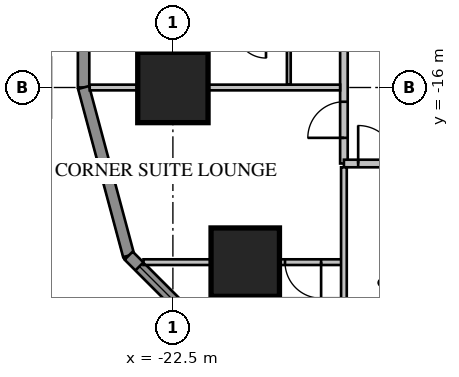
"""IFC4 building model, lengths in metres.
Left out: names, types, materials, properties, quantities, classifications, styles, units other than length and angle.
Written with IfcOpenShell. Run it as: python <this file> out.ifc"""

import sys

from ifc_helpers import new_model, si_unit, direction, frame, frame_2d, origin, origin_2d, place, context, subcontext, project, spatial, rectangle, extrude, element, fill, save


model = new_model("IFC4")
c1 = context("Model", 3, precision=1e-05, world=origin(), true_north=direction((0.0, 1.0)))
c2 = subcontext(c1, "Body", "Model", "MODEL_VIEW")
j1 = project(units=[si_unit("LENGTHUNIT", "METRE"), si_unit("PLANEANGLEUNIT", "RADIAN")], contexts=[c1])
p1 = place(None, origin())
s1 = spatial("IfcSite", under=j1, at=p1, CompositionType="ELEMENT")
p2 = place(p1, origin())
s2 = spatial("IfcBuilding", under=s1, at=p2, CompositionType="ELEMENT")
p3 = place(p2, frame((0.0, 0.0, 19.85)))
s3 = spatial("IfcBuildingStorey", under=s2, at=p3, CompositionType="ELEMENT", Elevation=19.85)
p4 = place(p3, frame((-22.5, -16.0, 0.0), z_axis=(0.0, 0.0, 1.0), x_axis=(1.0, 0.0, 0.0)))
e1 = element("IfcColumn", 1, at=p4, inside=s3, PredefinedType="COLUMN", context=c2, shape_type="SweptSolid", body=[
    extrude(rectangle(XDim=1.85, YDim=1.85, at=origin_2d()), origin(), (0.0, 0.0, 1.0), 3.85),
])
p5 = place(p3, frame((-20.596, -20.596, 0.0), z_axis=(0.0, 0.0, 1.0), x_axis=(1.0, 0.0, 0.0)))
e2 = element("IfcColumn", 2, at=p5, inside=s3, PredefinedType="COLUMN", context=c2, shape_type="SweptSolid", body=[
    extrude(rectangle(XDim=1.8, YDim=1.8, at=origin_2d()), origin(), (0.0, 0.0, 1.0), 3.85),
])
p6 = place(p3, frame((-24.85, 16.0, 0.0), z_axis=(0.0, 0.0, 1.0), x_axis=(0.0, -1.0, 0.0)))
e3 = element("IfcWall", 3, at=p6, inside=s3, PredefinedType="SOLIDWALL", context=c2, shape_type="SweptSolid", body=[
    extrude(rectangle(XDim=32.0, YDim=0.3, at=frame_2d((16.0, 0.0))), origin(), (0.0, 0.0, 1.0), 3.65),
])
p7 = place(p6, frame((1.2, 0.0, 0.75)))
e4 = element("IfcOpeningElement", 4, at=p7, cuts=e3, PredefinedType="OPENING", context=c2, shape_type="SweptSolid", body=[
    extrude(rectangle(XDim=1.6, YDim=1.8, at=frame_2d((0.8, 0.9))), frame((0.0, 0.17, 0.0), z_axis=(0.0, -1.0, 0.0), x_axis=(1.0, 0.0, 0.0)), (0.0, 0.0, 1.0), 0.34),
])
p8 = place(p6, frame((5.2, 0.0, 0.75)))
e5 = element("IfcOpeningElement", 5, at=p8, cuts=e3, PredefinedType="OPENING", context=c2, shape_type="SweptSolid", body=[
    extrude(rectangle(XDim=1.6, YDim=1.8, at=frame_2d((0.8, 0.9))), frame((0.0, 0.17, 0.0), z_axis=(0.0, -1.0, 0.0), x_axis=(1.0, 0.0, 0.0)), (0.0, 0.0, 1.0), 0.34),
])
p9 = place(p6, frame((17.2, 0.0, 0.75)))
e6 = element("IfcOpeningElement", 6, at=p9, cuts=e3, PredefinedType="OPENING", context=c2, shape_type="SweptSolid", body=[
    extrude(rectangle(XDim=1.6, YDim=1.8, at=frame_2d((0.8, 0.9))), frame((0.0, 0.17, 0.0), z_axis=(0.0, -1.0, 0.0), x_axis=(1.0, 0.0, 0.0)), (0.0, 0.0, 1.0), 0.34),
])
p10 = place(p6, frame((21.2, 0.0, 0.75)))
e7 = element("IfcOpeningElement", 7, at=p10, cuts=e3, PredefinedType="OPENING", context=c2, shape_type="SweptSolid", body=[
    extrude(rectangle(XDim=1.6, YDim=1.8, at=frame_2d((0.8, 0.9))), frame((0.0, 0.17, 0.0), z_axis=(0.0, -1.0, 0.0), x_axis=(1.0, 0.0, 0.0)), (0.0, 0.0, 1.0), 0.34),
])
p11 = place(p6, frame((25.2, 0.0, 0.75)))
e8 = element("IfcOpeningElement", 8, at=p11, cuts=e3, PredefinedType="OPENING", context=c2, shape_type="SweptSolid", body=[
    extrude(rectangle(XDim=1.6, YDim=1.8, at=frame_2d((0.8, 0.9))), frame((0.0, 0.17, 0.0), z_axis=(0.0, -1.0, 0.0), x_axis=(1.0, 0.0, 0.0)), (0.0, 0.0, 1.0), 0.34),
])
p12 = place(p6, frame((29.2, 0.0, 0.75)))
e9 = element("IfcOpeningElement", 9, at=p12, cuts=e3, PredefinedType="OPENING", context=c2, shape_type="SweptSolid", body=[
    extrude(rectangle(XDim=1.6, YDim=1.8, at=frame_2d((0.8, 0.9))), frame((0.0, 0.17, 0.0), z_axis=(0.0, -1.0, 0.0), x_axis=(1.0, 0.0, 0.0)), (0.0, 0.0, 1.0), 0.34),
])
p13 = place(p6, frame((8.8, 0.0, 0.75)))
e10 = element("IfcOpeningElement", 10, at=p13, cuts=e3, PredefinedType="OPENING", context=c2, shape_type="SweptSolid", body=[
    extrude(rectangle(XDim=2.4, YDim=1.8, at=frame_2d((1.2, 0.9))), frame((0.0, 0.17, 0.0), z_axis=(0.0, -1.0, 0.0), x_axis=(1.0, 0.0, 0.0)), (0.0, 0.0, 1.0), 0.34),
])
p14 = place(p6, frame((13.812, 0.0, 0.0)))
e11 = element("IfcOpeningElement", 11, at=p14, cuts=e3, PredefinedType="OPENING", context=c2, shape_type="SweptSolid", body=[
    extrude(rectangle(XDim=1.0, YDim=2.4, at=frame_2d((0.5, 1.2))), frame((0.0, 0.17, 0.0), z_axis=(0.0, -1.0, 0.0), x_axis=(1.0, 0.0, 0.0)), (0.0, 0.0, 1.0), 0.34),
])
p15 = place(p3, frame((-24.85, -16.0, 0.0), z_axis=(0.0, 0.0, 1.0), x_axis=(0.258839972501, -0.965920218567, 0.0)))
e12 = element("IfcWall", 12, at=p15, inside=s3, PredefinedType="SOLIDWALL", context=c2, shape_type="SweptSolid", body=[
    extrude(rectangle(XDim=4.581, YDim=0.3, at=frame_2d((2.291, 0.0))), origin(), (0.0, 0.0, 1.0), 3.65),
])
p16 = place(p3, frame((-23.664, -20.425, 0.0), z_axis=(0.0, 0.0, 1.0), x_axis=(0.707106781187, -0.707106781187, 0.0)))
e13 = element("IfcWall", 13, at=p16, inside=s3, PredefinedType="SOLIDWALL", context=c2, shape_type="SweptSolid", body=[
    extrude(rectangle(XDim=4.581, YDim=0.3, at=frame_2d((2.291, 0.0))), origin(), (0.0, 0.0, 1.0), 3.65),
])
p17 = place(p16, frame((0.4, 0.0, 0.75)))
e14 = element("IfcOpeningElement", 14, at=p17, cuts=e13, PredefinedType="OPENING", context=c2, shape_type="SweptSolid", body=[
    extrude(rectangle(XDim=3.781, YDim=1.8, at=frame_2d((1.891, 0.9))), frame((0.0, 0.17, 0.0), z_axis=(0.0, -1.0, 0.0), x_axis=(1.0, 0.0, 0.0)), (0.0, 0.0, 1.0), 0.34),
])
p18 = place(p3, frame((-18.0, 18.0, 0.0), z_axis=(0.0, 0.0, 1.0), x_axis=(0.0, -1.0, 0.0)))
e15 = element("IfcWall", 15, at=p18, inside=s3, PredefinedType="PARTITIONING", context=c2, shape_type="SweptSolid", body=[
    extrude(rectangle(XDim=36.0, YDim=0.2, at=frame_2d((18.0, 0.0))), origin(), (0.0, 0.0, 1.0), 3.65),
])
p19 = place(p18, frame((10.4, 0.0, 0.0)))
e16 = element("IfcOpeningElement", 16, at=p19, cuts=e15, PredefinedType="OPENING", context=c2, shape_type="SweptSolid", body=[
    extrude(rectangle(XDim=1.0, YDim=2.1, at=frame_2d((0.5, 1.05))), frame((0.0, 0.12, 0.0), z_axis=(0.0, -1.0, 0.0), x_axis=(1.0, 0.0, 0.0)), (0.0, 0.0, 1.0), 0.24),
])
p20 = place(p18, frame((14.4, 0.0, 0.0)))
e17 = element("IfcOpeningElement", 17, at=p20, cuts=e15, PredefinedType="OPENING", context=c2, shape_type="SweptSolid", body=[
    extrude(rectangle(XDim=1.0, YDim=2.1, at=frame_2d((0.5, 1.05))), frame((0.0, 0.12, 0.0), z_axis=(0.0, -1.0, 0.0), x_axis=(1.0, 0.0, 0.0)), (0.0, 0.0, 1.0), 0.24),
])
p21 = place(p18, frame((0.375, 0.0, 0.0)))
e18 = element("IfcOpeningElement", 18, at=p21, cuts=e15, PredefinedType="OPENING", context=c2, shape_type="SweptSolid", body=[
    extrude(rectangle(XDim=1.0, YDim=2.1, at=frame_2d((0.5, 1.05))), frame((0.0, 0.12, 0.0), z_axis=(0.0, -1.0, 0.0), x_axis=(1.0, 0.0, 0.0)), (0.0, 0.0, 1.0), 0.24),
])
p22 = place(p18, frame((34.375, 0.0, 0.0)))
e19 = element("IfcOpeningElement", 19, at=p22, cuts=e15, PredefinedType="OPENING", context=c2, shape_type="SweptSolid", body=[
    extrude(rectangle(XDim=0.95, YDim=2.1, at=frame_2d((0.475, 1.05))), frame((0.0, 0.12, 0.0), z_axis=(0.0, -1.0, 0.0), x_axis=(1.0, 0.0, 0.0)), (0.0, 0.0, 1.0), 0.24),
])
p23 = place(p3, frame((-19.45, 3.925, 0.0), z_axis=(0.0, 0.0, 1.0), x_axis=(0.0, -1.0, 0.0)))
e20 = element("IfcWall", 20, at=p23, inside=s3, PredefinedType="PARTITIONING", context=c2, shape_type="SweptSolid", body=[
    extrude(rectangle(XDim=19.85, YDim=0.1, at=frame_2d((9.925, 0.0))), origin(), (0.0, 0.0, 1.0), 3.65),
])
p24 = place(p23, frame((2.125, 0.0, 0.0)))
e21 = element("IfcOpeningElement", 21, at=p24, cuts=e20, PredefinedType="OPENING", context=c2, shape_type="SweptSolid", body=[
    extrude(rectangle(XDim=1.0, YDim=2.1, at=frame_2d((0.5, 1.05))), frame((0.0, 0.07, 0.0), z_axis=(0.0, -1.0, 0.0), x_axis=(1.0, 0.0, 0.0)), (0.0, 0.0, 1.0), 0.14),
])
p25 = place(p23, frame((0.3, 0.0, 0.0)))
e22 = element("IfcOpeningElement", 22, at=p25, cuts=e20, PredefinedType="OPENING", context=c2, shape_type="SweptSolid", body=[
    extrude(rectangle(XDim=0.8, YDim=2.1, at=frame_2d((0.4, 1.05))), frame((0.0, 0.07, 0.0), z_axis=(0.0, -1.0, 0.0), x_axis=(1.0, 0.0, 0.0)), (0.0, 0.0, 1.0), 0.14),
])
p26 = place(p23, frame((4.3, 0.0, 0.0)))
e23 = element("IfcOpeningElement", 23, at=p26, cuts=e20, PredefinedType="OPENING", context=c2, shape_type="SweptSolid", body=[
    extrude(rectangle(XDim=0.95, YDim=2.1, at=frame_2d((0.475, 1.05))), frame((0.0, 0.07, 0.0), z_axis=(0.0, -1.0, 0.0), x_axis=(1.0, 0.0, 0.0)), (0.0, 0.0, 1.0), 0.14),
])
p27 = place(p23, frame((8.3, 0.0, 0.0)))
e24 = element("IfcOpeningElement", 24, at=p27, cuts=e20, PredefinedType="OPENING", context=c2, shape_type="SweptSolid", body=[
    extrude(rectangle(XDim=0.95, YDim=2.1, at=frame_2d((0.475, 1.05))), frame((0.0, 0.07, 0.0), z_axis=(0.0, -1.0, 0.0), x_axis=(1.0, 0.0, 0.0)), (0.0, 0.0, 1.0), 0.14),
])
p28 = place(p23, frame((12.3, 0.0, 0.0)))
e25 = element("IfcOpeningElement", 25, at=p28, cuts=e20, PredefinedType="OPENING", context=c2, shape_type="SweptSolid", body=[
    extrude(rectangle(XDim=0.95, YDim=2.1, at=frame_2d((0.475, 1.05))), frame((0.0, 0.07, 0.0), z_axis=(0.0, -1.0, 0.0), x_axis=(1.0, 0.0, 0.0)), (0.0, 0.0, 1.0), 0.14),
])
p29 = place(p23, frame((16.3, 0.0, 0.0)))
e26 = element("IfcOpeningElement", 26, at=p29, cuts=e20, PredefinedType="OPENING", context=c2, shape_type="SweptSolid", body=[
    extrude(rectangle(XDim=0.95, YDim=2.1, at=frame_2d((0.475, 1.05))), frame((0.0, 0.07, 0.0), z_axis=(0.0, -1.0, 0.0), x_axis=(1.0, 0.0, 0.0)), (0.0, 0.0, 1.0), 0.14),
])
p30 = place(p3, frame((-18.1, -16.0, 0.0), z_axis=(0.0, 0.0, 1.0), x_axis=(-1.0, 0.0, 0.0)))
e27 = element("IfcWall", 27, at=p30, inside=s3, PredefinedType="PARTITIONING", context=c2, shape_type="SweptSolid", body=[
    extrude(rectangle(XDim=6.589, YDim=0.15, at=frame_2d((3.295, 0.0))), origin(), (0.0, 0.0, 1.0), 3.65),
])
p31 = place(p3, frame((-22.15, -14.475, 0.0), z_axis=(0.0, 0.0, 1.0), x_axis=(0.0, -1.0, 0.0)))
e28 = element("IfcWall", 28, at=p31, inside=s3, PredefinedType="PARTITIONING", context=c2, shape_type="SweptSolid", body=[
    extrude(rectangle(XDim=1.45, YDim=0.1, at=frame_2d((0.725, 0.0))), origin(), (0.0, 0.0, 1.0), 3.65),
])
p32 = place(p3, frame((-18.065, -20.596, 0.0), z_axis=(0.0, 0.0, 1.0), x_axis=(-1.0, 0.0, 0.0)))
e29 = element("IfcWall", 29, at=p32, inside=s3, PredefinedType="PARTITIONING", context=c2, shape_type="SweptSolid", body=[
    extrude(rectangle(XDim=5.209, YDim=0.15, at=frame_2d((2.604, 0.0))), origin(), (0.0, 0.0, 1.0), 3.65),
])
p33 = place(p32, frame((0.535, 0.0, 0.0)))
e30 = element("IfcOpeningElement", 30, at=p33, cuts=e29, PredefinedType="OPENING", context=c2, shape_type="SweptSolid", body=[
    extrude(rectangle(XDim=0.95, YDim=2.1, at=frame_2d((0.475, 1.05))), frame((0.0, 0.095, 0.0), z_axis=(0.0, -1.0, 0.0), x_axis=(1.0, 0.0, 0.0)), (0.0, 0.0, 1.0), 0.19),
])
p34 = place(p3, frame((-18.0, -18.0, 0.0), z_axis=(0.0, 0.0, 1.0), x_axis=(1.0, 0.0, 0.0)))
e31 = element("IfcWall", 31, at=p34, inside=s3, PredefinedType="PARTITIONING", context=c2, shape_type="SweptSolid", body=[
    extrude(rectangle(XDim=36.0, YDim=0.2, at=frame_2d((18.0, 0.0))), origin(), (0.0, 0.0, 1.0), 3.65),
])
p35 = place(p34, frame((0.375, 0.0, 0.0)))
e32 = element("IfcOpeningElement", 32, at=p35, cuts=e31, PredefinedType="OPENING", context=c2, shape_type="SweptSolid", body=[
    extrude(rectangle(XDim=1.0, YDim=2.1, at=frame_2d((0.5, 1.05))), frame((0.0, 0.12, 0.0), z_axis=(0.0, -1.0, 0.0), x_axis=(1.0, 0.0, 0.0)), (0.0, 0.0, 1.0), 0.24),
])
p36 = place(p34, frame((2.45, 0.0, 0.0)))
e33 = element("IfcOpeningElement", 33, at=p36, cuts=e31, PredefinedType="OPENING", context=c2, shape_type="SweptSolid", body=[
    extrude(rectangle(XDim=0.8, YDim=2.1, at=frame_2d((0.4, 1.05))), frame((0.0, 0.12, 0.0), z_axis=(0.0, -1.0, 0.0), x_axis=(1.0, 0.0, 0.0)), (0.0, 0.0, 1.0), 0.24),
])
p37 = place(p34, frame((4.05, 0.0, 0.0)))
e34 = element("IfcOpeningElement", 34, at=p37, cuts=e31, PredefinedType="OPENING", context=c2, shape_type="SweptSolid", body=[
    extrude(rectangle(XDim=1.0, YDim=2.1, at=frame_2d((0.5, 1.05))), frame((0.0, 0.12, 0.0), z_axis=(0.0, -1.0, 0.0), x_axis=(1.0, 0.0, 0.0)), (0.0, 0.0, 1.0), 0.24),
])
p38 = place(p34, frame((6.45, 0.0, 0.0)))
e35 = element("IfcOpeningElement", 35, at=p38, cuts=e31, PredefinedType="OPENING", context=c2, shape_type="SweptSolid", body=[
    extrude(rectangle(XDim=0.9, YDim=2.1, at=frame_2d((0.45, 1.05))), frame((0.0, 0.12, 0.0), z_axis=(0.0, -1.0, 0.0), x_axis=(1.0, 0.0, 0.0)), (0.0, 0.0, 1.0), 0.24),
])
p39 = place(p34, frame((8.15, 0.0, 0.0)))
e36 = element("IfcOpeningElement", 36, at=p39, cuts=e31, PredefinedType="OPENING", context=c2, shape_type="SweptSolid", body=[
    extrude(rectangle(XDim=1.0, YDim=2.1, at=frame_2d((0.5, 1.05))), frame((0.0, 0.12, 0.0), z_axis=(0.0, -1.0, 0.0), x_axis=(1.0, 0.0, 0.0)), (0.0, 0.0, 1.0), 0.24),
])
p40 = place(p34, frame((19.8, 0.0, 0.0)))
e37 = element("IfcOpeningElement", 37, at=p40, cuts=e31, PredefinedType="OPENING", context=c2, shape_type="SweptSolid", body=[
    extrude(rectangle(XDim=0.95, YDim=2.1, at=frame_2d((0.475, 1.05))), frame((0.0, 0.12, 0.0), z_axis=(0.0, -1.0, 0.0), x_axis=(1.0, 0.0, 0.0)), (0.0, 0.0, 1.0), 0.24),
])
p41 = place(p34, frame((23.8, 0.0, 0.0)))
e38 = element("IfcOpeningElement", 38, at=p41, cuts=e31, PredefinedType="OPENING", context=c2, shape_type="SweptSolid", body=[
    extrude(rectangle(XDim=0.95, YDim=2.1, at=frame_2d((0.475, 1.05))), frame((0.0, 0.12, 0.0), z_axis=(0.0, -1.0, 0.0), x_axis=(1.0, 0.0, 0.0)), (0.0, 0.0, 1.0), 0.24),
])
p42 = place(p34, frame((27.8, 0.0, 0.0)))
e39 = element("IfcOpeningElement", 39, at=p42, cuts=e31, PredefinedType="OPENING", context=c2, shape_type="SweptSolid", body=[
    extrude(rectangle(XDim=0.95, YDim=2.1, at=frame_2d((0.475, 1.05))), frame((0.0, 0.12, 0.0), z_axis=(0.0, -1.0, 0.0), x_axis=(1.0, 0.0, 0.0)), (0.0, 0.0, 1.0), 0.24),
])
p43 = place(p34, frame((31.8, 0.0, 0.0)))
e40 = element("IfcOpeningElement", 40, at=p43, cuts=e31, PredefinedType="OPENING", context=c2, shape_type="SweptSolid", body=[
    extrude(rectangle(XDim=0.95, YDim=2.1, at=frame_2d((0.475, 1.05))), frame((0.0, 0.12, 0.0), z_axis=(0.0, -1.0, 0.0), x_axis=(1.0, 0.0, 0.0)), (0.0, 0.0, 1.0), 0.24),
])
p44 = place(p34, frame((34.375, 0.0, 0.0)))
e41 = element("IfcOpeningElement", 41, at=p44, cuts=e31, PredefinedType="OPENING", context=c2, shape_type="SweptSolid", body=[
    extrude(rectangle(XDim=0.95, YDim=2.1, at=frame_2d((0.475, 1.05))), frame((0.0, 0.12, 0.0), z_axis=(0.0, -1.0, 0.0), x_axis=(1.0, 0.0, 0.0)), (0.0, 0.0, 1.0), 0.24),
])
p45 = place(p34, frame((11.2, 0.0, 0.0)))
e42 = element("IfcOpeningElement", 42, at=p45, cuts=e31, PredefinedType="OPENING", context=c2, shape_type="SweptSolid", body=[
    extrude(rectangle(XDim=1.0, YDim=2.1, at=frame_2d((0.5, 1.05))), frame((0.0, 0.12, 0.0), z_axis=(0.0, -1.0, 0.0), x_axis=(1.0, 0.0, 0.0)), (0.0, 0.0, 1.0), 0.24),
])
p46 = place(p3, frame((-18.0, -18.1, 0.0), z_axis=(0.0, 0.0, 1.0), x_axis=(0.0, -1.0, 0.0)))
e43 = element("IfcWall", 43, at=p46, inside=s3, PredefinedType="PARTITIONING", context=c2, shape_type="SweptSolid", body=[
    extrude(rectangle(XDim=6.053, YDim=0.15, at=frame_2d((3.027, 0.0))), origin(), (0.0, 0.0, 1.0), 3.65),
])
p47 = place(p17, origin())
e44 = element("IfcWindow", 44, at=p47, inside=s3, PartitioningType="SINGLE_PANEL", PredefinedType="WINDOW", context=c2, shape_type="SweptSolid", body=[
    extrude(rectangle(XDim=3.781, YDim=1.8, at=frame_2d((1.891, 0.9))), frame((0.0, 0.03, 0.0), z_axis=(0.0, -1.0, 0.0), x_axis=(1.0, 0.0, 0.0)), (0.0, 0.0, 1.0), 0.06),
])
fill(e14, e44)
p48 = place(p22, origin())
e45 = element("IfcDoor", 45, at=p48, inside=s3, OperationType="SINGLE_SWING_RIGHT", PredefinedType="DOOR", context=c2, shape_type="SweptSolid", body=[
    extrude(rectangle(XDim=0.95, YDim=2.1, at=frame_2d((0.475, 1.05))), frame((0.0, 0.025, 0.0), z_axis=(0.0, -1.0, 0.0), x_axis=(1.0, 0.0, 0.0)), (0.0, 0.0, 1.0), 0.05),
])
fill(e19, e45)
p49 = place(p33, origin())
e46 = element("IfcDoor", 46, at=p49, inside=s3, OperationType="SINGLE_SWING_LEFT", PredefinedType="DOOR", context=c2, shape_type="SweptSolid", body=[
    extrude(rectangle(XDim=0.95, YDim=2.1, at=frame_2d((0.475, 1.05))), frame((0.0, 0.025, 0.0), z_axis=(0.0, -1.0, 0.0), x_axis=(1.0, 0.0, 0.0)), (0.0, 0.0, 1.0), 0.05),
])
fill(e30, e46)
p50 = place(p35, origin())
e47 = element("IfcDoor", 47, at=p50, inside=s3, OperationType="SINGLE_SWING_LEFT", PredefinedType="DOOR", context=c2, shape_type="SweptSolid", body=[
    extrude(rectangle(XDim=1.0, YDim=2.1, at=frame_2d((0.5, 1.05))), frame((0.0, 0.025, 0.0), z_axis=(0.0, -1.0, 0.0), x_axis=(1.0, 0.0, 0.0)), (0.0, 0.0, 1.0), 0.05),
])
fill(e32, e47)
save(model, sys.argv[1])
